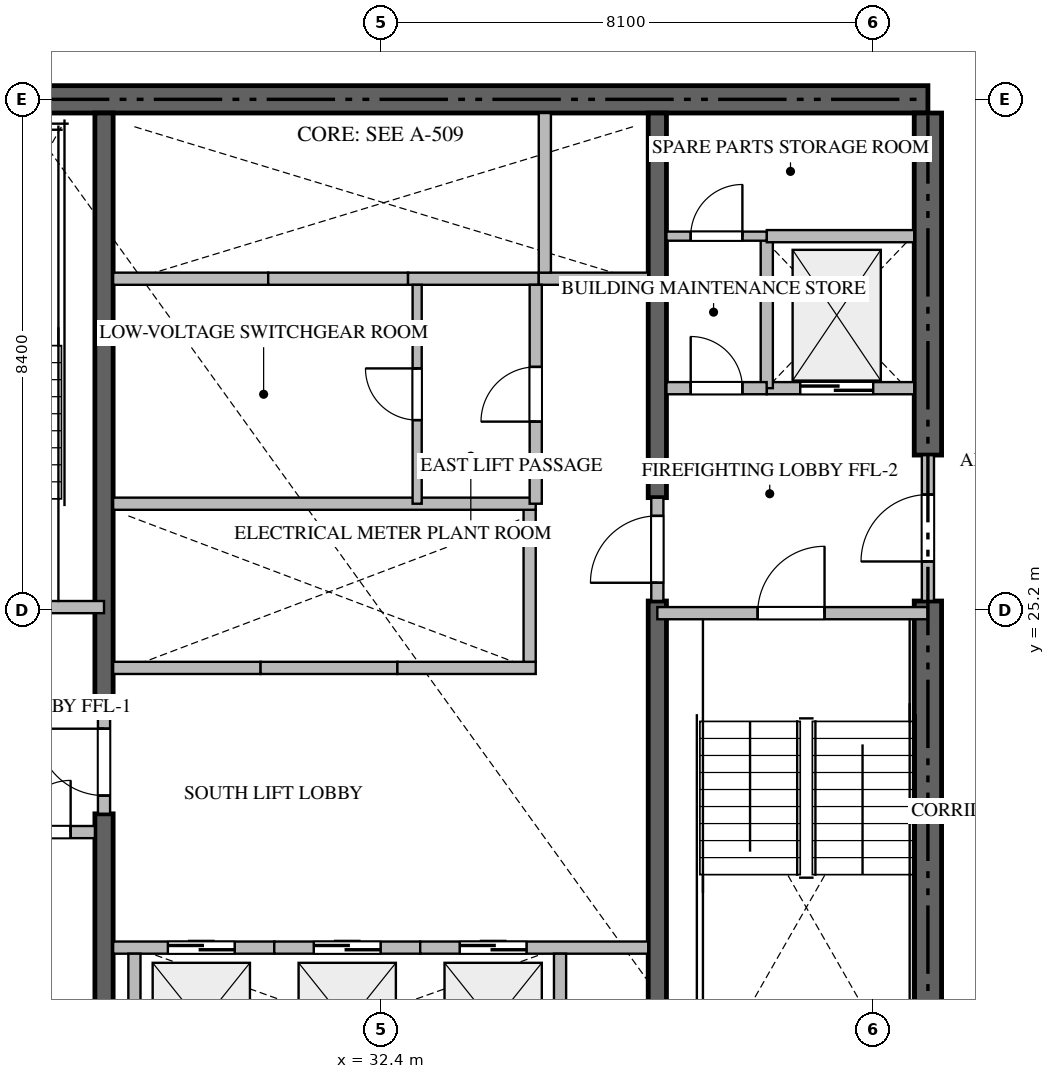
"""IFC4 building model, lengths in metres.
Left out: names, types, materials, properties, quantities, classifications, styles, units other than length and angle.
Written with IfcOpenShell. Run it as: python <this file> out.ifc"""

import sys

from ifc_helpers import new_model, si_unit, direction, frame, frame_2d, origin, place, context, subcontext, project, spatial, rectangle, extrude, source, transform, mapped, element, fill, save


model = new_model("IFC4")
c1 = context("Model", 3, precision=1e-05, world=origin(), true_north=direction((0.0, 1.0)))
c2 = subcontext(c1, "Body", "Model", "MODEL_VIEW")
j1 = project(units=[si_unit("LENGTHUNIT", "METRE"), si_unit("PLANEANGLEUNIT", "RADIAN")], contexts=[c1])
p1 = place(None, origin())
s1 = spatial("IfcSite", under=j1, at=p1, CompositionType="ELEMENT")
p2 = place(p1, origin())
s2 = spatial("IfcBuilding", under=s1, at=p2, CompositionType="ELEMENT")
p3 = place(p2, frame((0.0, 0.0, 26.7)))
s3 = spatial("IfcBuildingStorey", under=s2, at=p3, CompositionType="ELEMENT", Elevation=26.7)
p4 = place(p3, frame((41.4, 33.6, -0.44), z_axis=(0.0, 0.0, 1.0), x_axis=(-1.0, 0.0, 0.0)))
e1 = element("IfcWall", 1, at=p4, inside=s3, PredefinedType="SHEAR", context=c2, shape_type="SweptSolid", body=[
    extrude(rectangle(XDim=18.0, YDim=0.45, at=frame_2d((9.0, 0.0))), origin(), (0.0, 0.0, 1.0), 3.928),
])
p5 = place(p3, frame((41.4, 17.025, -0.44), z_axis=(0.0, 0.0, 1.0), x_axis=(0.0, 1.0, 0.0)))
e2 = element("IfcWall", 2, at=p5, inside=s3, PredefinedType="SHEAR", context=c2, shape_type="SweptSolid", body=[
    extrude(rectangle(XDim=8.325, YDim=0.45, at=frame_2d((4.163, 0.0))), origin(), (0.0, 0.0, 1.0), 3.928),
])
p6 = place(p3, frame((41.4, 27.75, -0.44), z_axis=(0.0, 0.0, 1.0), x_axis=(0.0, 1.0, 0.0)))
e3 = element("IfcWall", 3, at=p6, inside=s3, PredefinedType="SHEAR", context=c2, shape_type="SweptSolid", body=[
    extrude(rectangle(XDim=5.625, YDim=0.45, at=frame_2d((2.812, 0.0))), origin(), (0.0, 0.0, 1.0), 3.928),
])
p7 = place(p3, frame((27.85, 17.025, -0.44), z_axis=(0.0, 0.0, 1.0), x_axis=(0.0, 1.0, 0.0)))
e4 = element("IfcWall", 4, at=p7, inside=s3, PredefinedType="SHEAR", context=c2, shape_type="SweptSolid", body=[
    extrude(rectangle(XDim=4.825, YDim=0.3, at=frame_2d((2.413, 0.0))), origin(), (0.0, 0.0, 1.0), 3.928),
])
p8 = place(p3, frame((27.85, 23.55, -0.44), z_axis=(0.0, 0.0, 1.0), x_axis=(0.0, 1.0, 0.0)))
e5 = element("IfcWall", 5, at=p8, inside=s3, PredefinedType="SHEAR", context=c2, shape_type="SweptSolid", body=[
    extrude(rectangle(XDim=9.825, YDim=0.3, at=frame_2d((4.913, 0.0))), origin(), (0.0, 0.0, 1.0), 3.928),
])
p9 = place(p3, frame((36.95, 17.025, -0.44), z_axis=(0.0, 0.0, 1.0), x_axis=(0.0, 1.0, 0.0)))
e6 = element("IfcWall", 6, at=p9, inside=s3, PredefinedType="SHEAR", context=c2, shape_type="SweptSolid", body=[
    extrude(rectangle(XDim=8.325, YDim=0.3, at=frame_2d((4.163, 0.0))), origin(), (0.0, 0.0, 1.0), 3.928),
])
p10 = place(p3, frame((36.95, 27.05, -0.44), z_axis=(0.0, 0.0, 1.0), x_axis=(0.0, 1.0, 0.0)))
e7 = element("IfcWall", 7, at=p10, inside=s3, PredefinedType="SHEAR", context=c2, shape_type="SweptSolid", body=[
    extrude(rectangle(XDim=6.325, YDim=0.3, at=frame_2d((3.163, 0.0))), origin(), (0.0, 0.0, 1.0), 3.928),
])
p11 = place(p3, frame((23.4, 25.25, 0.0), z_axis=(0.0, 0.0, 1.0), x_axis=(1.0, 0.0, 0.0)))
e8 = element("IfcWall", 8, at=p11, inside=s3, PredefinedType="STANDARD", context=c2, shape_type="SweptSolid", body=[
    extrude(rectangle(XDim=4.45, YDim=0.2, at=frame_2d((2.225, 0.0))), origin(), (0.0, 0.0, 1.0), 3.49),
])
p12 = place(p11, frame((1.65, 0.0, 0.0)))
e9 = element("IfcOpeningElement", 9, at=p12, cuts=e8, PredefinedType="OPENING", context=c2, shape_type="SweptSolid", body=[
    extrude(rectangle(XDim=1.1, YDim=2.15, at=frame_2d((0.55, 1.075))), frame((0.0, 0.11, 0.0), z_axis=(0.0, -1.0, 0.0), x_axis=(1.0, 0.0, 0.0)), (0.0, 0.0, 1.0), 0.22),
])
p13 = place(p3, frame((36.95, 25.15, 0.0), z_axis=(0.0, 0.0, 1.0), x_axis=(1.0, 0.0, 0.0)))
e10 = element("IfcWall", 10, at=p13, inside=s3, PredefinedType="STANDARD", context=c2, shape_type="SweptSolid", body=[
    extrude(rectangle(XDim=4.45, YDim=0.2, at=frame_2d((2.225, 0.0))), origin(), (0.0, 0.0, 1.0), 3.49),
])
p14 = place(p13, frame((1.65, 0.0, 0.0)))
e11 = element("IfcOpeningElement", 11, at=p14, cuts=e10, PredefinedType="OPENING", context=c2, shape_type="SweptSolid", body=[
    extrude(rectangle(XDim=1.1, YDim=2.15, at=frame_2d((0.55, 1.075))), frame((0.0, 0.11, 0.0), z_axis=(0.0, -1.0, 0.0), x_axis=(1.0, 0.0, 0.0)), (0.0, 0.0, 1.0), 0.22),
])
p15 = place(p3, frame((38.75, 28.85, 0.0), z_axis=(0.0, 0.0, 1.0), x_axis=(1.0, 0.0, 0.0)))
e12 = element("IfcWall", 12, at=p15, inside=s3, PredefinedType="STANDARD", context=c2, shape_type="SweptSolid", body=[
    extrude(rectangle(XDim=2.425, YDim=0.2, at=frame_2d((1.212, 0.0))), origin(), (0.0, 0.0, 1.0), 3.49),
])
p16 = place(p15, frame((0.55, 0.0, 0.0)))
e13 = element("IfcOpeningElement", 13, at=p16, cuts=e12, PredefinedType="OPENING", context=c2, shape_type="SweptSolid", body=[
    extrude(rectangle(XDim=1.2, YDim=2.2, at=frame_2d((0.6, 1.1))), frame((0.0, 0.11, 0.0), z_axis=(0.0, -1.0, 0.0), x_axis=(1.0, 0.0, 0.0)), (0.0, 0.0, 1.0), 0.22),
])
p17 = place(p3, frame((28.0, 19.65, 0.0), z_axis=(0.0, 0.0, 1.0), x_axis=(1.0, 0.0, 0.0)))
e14 = element("IfcWall", 14, at=p17, inside=s3, PredefinedType="STANDARD", context=c2, shape_type="SweptSolid", body=[
    extrude(rectangle(XDim=2.65, YDim=0.2, at=frame_2d((1.325, 0.0))), origin(), (0.0, 0.0, 1.0), 3.49),
])
p18 = place(p17, frame((0.9, 0.0, 0.0)))
e15 = element("IfcOpeningElement", 15, at=p18, cuts=e14, PredefinedType="OPENING", context=c2, shape_type="SweptSolid", body=[
    extrude(rectangle(XDim=1.1, YDim=2.2, at=frame_2d((0.55, 1.1))), frame((0.0, 0.11, 0.0), z_axis=(0.0, -1.0, 0.0), x_axis=(1.0, 0.0, 0.0)), (0.0, 0.0, 1.0), 0.22),
])
p19 = place(p3, frame((28.35, 17.025, 0.0), z_axis=(0.0, 0.0, 1.0), x_axis=(0.0, 1.0, 0.0)))
e16 = element("IfcWall", 16, at=p19, inside=s3, PredefinedType="STANDARD", context=c2, shape_type="SweptSolid", body=[
    extrude(rectangle(XDim=2.525, YDim=0.2, at=frame_2d((1.263, 0.0))), origin(), (0.0, 0.0, 1.0), 3.49),
])
p20 = place(p3, frame((30.65, 19.65, 0.0), z_axis=(0.0, 0.0, 1.0), x_axis=(1.0, 0.0, 0.0)))
e17 = element("IfcWall", 17, at=p20, inside=s3, PredefinedType="STANDARD", context=c2, shape_type="SweptSolid", body=[
    extrude(rectangle(XDim=2.4, YDim=0.2, at=frame_2d((1.2, 0.0))), origin(), (0.0, 0.0, 1.0), 3.49),
])
p21 = place(p20, frame((0.65, 0.0, 0.0)))
e18 = element("IfcOpeningElement", 18, at=p21, cuts=e17, PredefinedType="OPENING", context=c2, shape_type="SweptSolid", body=[
    extrude(rectangle(XDim=1.1, YDim=2.2, at=frame_2d((0.55, 1.1))), frame((0.0, 0.11, 0.0), z_axis=(0.0, -1.0, 0.0), x_axis=(1.0, 0.0, 0.0)), (0.0, 0.0, 1.0), 0.22),
])
p22 = place(p3, frame((33.05, 19.65, 0.0), z_axis=(0.0, 0.0, 1.0), x_axis=(1.0, 0.0, 0.0)))
e19 = element("IfcWall", 19, at=p22, inside=s3, PredefinedType="STANDARD", context=c2, shape_type="SweptSolid", body=[
    extrude(rectangle(XDim=3.75, YDim=0.2, at=frame_2d((1.875, 0.0))), origin(), (0.0, 0.0, 1.0), 3.49),
])
p23 = place(p22, frame((0.65, 0.0, 0.0)))
e20 = element("IfcOpeningElement", 20, at=p23, cuts=e19, PredefinedType="OPENING", context=c2, shape_type="SweptSolid", body=[
    extrude(rectangle(XDim=1.1, YDim=2.2, at=frame_2d((0.55, 1.1))), frame((0.0, 0.11, 0.0), z_axis=(0.0, -1.0, 0.0), x_axis=(1.0, 0.0, 0.0)), (0.0, 0.0, 1.0), 0.22),
])
p24 = place(p3, frame((35.35, 17.025, 0.0), z_axis=(0.0, 0.0, 1.0), x_axis=(0.0, 1.0, 0.0)))
e21 = element("IfcWall", 21, at=p24, inside=s3, PredefinedType="STANDARD", context=c2, shape_type="SweptSolid", body=[
    extrude(rectangle(XDim=2.525, YDim=0.2, at=frame_2d((1.263, 0.0))), origin(), (0.0, 0.0, 1.0), 3.49),
])
p25 = place(p3, frame((28.0, 24.25, 0.0), z_axis=(0.0, 0.0, 1.0), x_axis=(1.0, 0.0, 0.0)))
e22 = element("IfcWall", 22, at=p25, inside=s3, PredefinedType="STANDARD", context=c2, shape_type="SweptSolid", body=[
    extrude(rectangle(XDim=2.425, YDim=0.2, at=frame_2d((1.212, 0.0))), origin(), (0.0, 0.0, 1.0), 3.49),
])
p26 = place(p3, frame((30.425, 24.25, 0.0), z_axis=(0.0, 0.0, 1.0), x_axis=(1.0, 0.0, 0.0)))
e23 = element("IfcWall", 23, at=p26, inside=s3, PredefinedType="STANDARD", context=c2, shape_type="SweptSolid", body=[
    extrude(rectangle(XDim=2.25, YDim=0.2, at=frame_2d((1.125, 0.0))), origin(), (0.0, 0.0, 1.0), 3.49),
])
p27 = place(p3, frame((32.675, 24.25, 0.0), z_axis=(0.0, 0.0, 1.0), x_axis=(1.0, 0.0, 0.0)))
e24 = element("IfcWall", 24, at=p27, inside=s3, PredefinedType="STANDARD", context=c2, shape_type="SweptSolid", body=[
    extrude(rectangle(XDim=2.275, YDim=0.2, at=frame_2d((1.137, 0.0))), origin(), (0.0, 0.0, 1.0), 3.49),
])
p28 = place(p3, frame((34.85, 24.35, 0.0), z_axis=(0.0, 0.0, 1.0), x_axis=(0.0, 1.0, 0.0)))
e25 = element("IfcWall", 25, at=p28, inside=s3, PredefinedType="STANDARD", context=c2, shape_type="SweptSolid", body=[
    extrude(rectangle(XDim=2.5, YDim=0.2, at=frame_2d((1.25, 0.0))), origin(), (0.0, 0.0, 1.0), 3.49),
])
p29 = place(p3, frame((28.0, 30.65, 0.0), z_axis=(0.0, 0.0, 1.0), x_axis=(1.0, 0.0, 0.0)))
e26 = element("IfcWall", 26, at=p29, inside=s3, PredefinedType="STANDARD", context=c2, shape_type="SweptSolid", body=[
    extrude(rectangle(XDim=2.55, YDim=0.2, at=frame_2d((1.275, 0.0))), origin(), (0.0, 0.0, 1.0), 3.49),
])
p30 = place(p3, frame((30.55, 30.65, 0.0), z_axis=(0.0, 0.0, 1.0), x_axis=(1.0, 0.0, 0.0)))
e27 = element("IfcWall", 27, at=p30, inside=s3, PredefinedType="STANDARD", context=c2, shape_type="SweptSolid", body=[
    extrude(rectangle(XDim=2.3, YDim=0.2, at=frame_2d((1.15, 0.0))), origin(), (0.0, 0.0, 1.0), 3.49),
])
p31 = place(p3, frame((32.85, 30.65, 0.0), z_axis=(0.0, 0.0, 1.0), x_axis=(1.0, 0.0, 0.0)))
e28 = element("IfcWall", 28, at=p31, inside=s3, PredefinedType="STANDARD", context=c2, shape_type="SweptSolid", body=[
    extrude(rectangle(XDim=2.15, YDim=0.2, at=frame_2d((1.075, 0.0))), origin(), (0.0, 0.0, 1.0), 3.49),
])
p32 = place(p3, frame((35.0, 30.65, 0.0), z_axis=(0.0, 0.0, 1.0), x_axis=(1.0, 0.0, 0.0)))
e29 = element("IfcWall", 29, at=p32, inside=s3, PredefinedType="STANDARD", context=c2, shape_type="SweptSolid", body=[
    extrude(rectangle(XDim=1.8, YDim=0.2, at=frame_2d((0.9, 0.0))), origin(), (0.0, 0.0, 1.0), 3.49),
])
p33 = place(p3, frame((35.1, 30.75, 0.0), z_axis=(0.0, 0.0, 1.0), x_axis=(0.0, 1.0, 0.0)))
e30 = element("IfcWall", 30, at=p33, inside=s3, PredefinedType="STANDARD", context=c2, shape_type="SweptSolid", body=[
    extrude(rectangle(XDim=2.625, YDim=0.2, at=frame_2d((1.312, 0.0))), origin(), (0.0, 0.0, 1.0), 3.49),
])
p34 = place(p3, frame((26.052, 21.55, 0.0), z_axis=(0.0, 0.0, 1.0), x_axis=(1.0, 0.0, 0.0)))
e31 = element("IfcWall", 31, at=p34, inside=s3, PredefinedType="STANDARD", context=c2, shape_type="SweptSolid", body=[
    extrude(rectangle(XDim=1.648, YDim=0.2, at=frame_2d((0.824, 0.0))), origin(), (0.0, 0.0, 1.0), 3.49),
])
p35 = place(p34, frame((0.399, 0.0, 0.0)))
e32 = element("IfcOpeningElement", 32, at=p35, cuts=e31, PredefinedType="OPENING", context=c2, shape_type="SweptSolid", body=[
    extrude(rectangle(XDim=0.85, YDim=2.1, at=frame_2d((0.425, 1.05))), frame((0.0, 0.11, 0.0), z_axis=(0.0, -1.0, 0.0), x_axis=(1.0, 0.0, 0.0)), (0.0, 0.0, 1.0), 0.22),
])
p36 = place(p3, frame((38.75, 28.85, 0.0), z_axis=(0.0, 0.0, 1.0), x_axis=(0.0, 1.0, 0.0)))
e33 = element("IfcWall", 33, at=p36, inside=s3, PredefinedType="STANDARD", context=c2, shape_type="SweptSolid", body=[
    extrude(rectangle(XDim=2.5, YDim=0.2, at=frame_2d((1.25, 0.0))), origin(), (0.0, 0.0, 1.0), 3.49),
])
p37 = place(p3, frame((38.75, 31.35, 0.0), z_axis=(0.0, 0.0, 1.0), x_axis=(1.0, 0.0, 0.0)))
e34 = element("IfcWall", 34, at=p37, inside=s3, PredefinedType="STANDARD", context=c2, shape_type="SweptSolid", body=[
    extrude(rectangle(XDim=2.425, YDim=0.2, at=frame_2d((1.212, 0.0))), origin(), (0.0, 0.0, 1.0), 3.49),
])
p38 = place(p3, frame((37.1, 28.85, 0.0), z_axis=(0.0, 0.0, 1.0), x_axis=(1.0, 0.0, 0.0)))
e35 = element("IfcWall", 35, at=p38, inside=s3, PredefinedType="STANDARD", context=c2, shape_type="SweptSolid", body=[
    extrude(rectangle(XDim=1.648, YDim=0.2, at=frame_2d((0.824, 0.0))), origin(), (0.0, 0.0, 1.0), 3.49),
])
p39 = place(p38, frame((0.399, 0.0, 0.0)))
e36 = element("IfcOpeningElement", 36, at=p39, cuts=e35, PredefinedType="OPENING", context=c2, shape_type="SweptSolid", body=[
    extrude(rectangle(XDim=0.85, YDim=2.1, at=frame_2d((0.425, 1.05))), frame((0.0, 0.11, 0.0), z_axis=(0.0, -1.0, 0.0), x_axis=(1.0, 0.0, 0.0)), (0.0, 0.0, 1.0), 0.22),
])
p40 = place(p3, frame((41.4, 25.352, 0.0), z_axis=(0.0, 0.0, 1.0), x_axis=(0.0, 1.0, 0.0)))
e37 = element("IfcWall", 37, at=p40, inside=s3, PredefinedType="STANDARD", context=c2, shape_type="SweptSolid", body=[
    extrude(rectangle(XDim=2.396, YDim=0.2, at=frame_2d((1.198, 0.0))), origin(), (0.0, 0.0, 1.0), 3.49),
])
p41 = place(p40, frame((0.648, 0.0, 0.0)))
e38 = element("IfcOpeningElement", 38, at=p41, cuts=e37, PredefinedType="OPENING", context=c2, shape_type="SweptSolid", body=[
    extrude(rectangle(XDim=1.1, YDim=2.15, at=frame_2d((0.55, 1.075))), frame((0.0, 0.11, 0.0), z_axis=(0.0, -1.0, 0.0), x_axis=(1.0, 0.0, 0.0)), (0.0, 0.0, 1.0), 0.22),
])
p42 = place(p3, frame((27.85, 21.852, 0.0), z_axis=(0.0, 0.0, 1.0), x_axis=(0.0, 1.0, 0.0)))
e39 = element("IfcWall", 39, at=p42, inside=s3, PredefinedType="STANDARD", context=c2, shape_type="SweptSolid", body=[
    extrude(rectangle(XDim=1.696, YDim=0.2, at=frame_2d((0.848, 0.0))), origin(), (0.0, 0.0, 1.0), 3.49),
])
p43 = place(p42, frame((0.298, 0.0, 0.0)))
e40 = element("IfcOpeningElement", 40, at=p43, cuts=e39, PredefinedType="OPENING", context=c2, shape_type="SweptSolid", body=[
    extrude(rectangle(XDim=1.1, YDim=2.15, at=frame_2d((0.55, 1.075))), frame((0.0, 0.11, 0.0), z_axis=(0.0, -1.0, 0.0), x_axis=(1.0, 0.0, 0.0)), (0.0, 0.0, 1.0), 0.22),
])
p44 = place(p3, frame((36.95, 25.352, 0.0), z_axis=(0.0, 0.0, 1.0), x_axis=(0.0, 1.0, 0.0)))
e41 = element("IfcWall", 41, at=p44, inside=s3, PredefinedType="STANDARD", context=c2, shape_type="SweptSolid", body=[
    extrude(rectangle(XDim=1.696, YDim=0.2, at=frame_2d((0.848, 0.0))), origin(), (0.0, 0.0, 1.0), 3.49),
])
p45 = place(p44, frame((0.298, 0.0, 0.0)))
e42 = element("IfcOpeningElement", 42, at=p45, cuts=e41, PredefinedType="OPENING", context=c2, shape_type="SweptSolid", body=[
    extrude(rectangle(XDim=1.1, YDim=2.15, at=frame_2d((0.55, 1.075))), frame((0.0, 0.11, 0.0), z_axis=(0.0, -1.0, 0.0), x_axis=(1.0, 0.0, 0.0)), (0.0, 0.0, 1.0), 0.22),
])
p46 = place(p3, frame((28.0, 26.95, 0.0), z_axis=(0.0, 0.0, 1.0), x_axis=(1.0, 0.0, 0.0)))
e43 = element("IfcWall", 43, at=p46, inside=s3, PredefinedType="STANDARD", context=c2, shape_type="SweptSolid", body=[
    extrude(rectangle(XDim=6.95, YDim=0.2, at=frame_2d((3.475, 0.0))), origin(), (0.0, 0.0, 1.0), 3.49),
])
p47 = place(p3, frame((37.1, 31.35, 0.0), z_axis=(0.0, 0.0, 1.0), x_axis=(1.0, 0.0, 0.0)))
e44 = element("IfcWall", 44, at=p47, inside=s3, PredefinedType="PARTITIONING", context=c2, shape_type="SweptSolid", body=[
    extrude(rectangle(XDim=1.648, YDim=0.15, at=frame_2d((0.824, 0.0))), origin(), (0.0, 0.0, 1.0), 3.49),
])
p48 = place(p47, frame((0.399, 0.0, 0.0)))
e45 = element("IfcOpeningElement", 45, at=p48, cuts=e44, PredefinedType="OPENING", context=c2, shape_type="SweptSolid", body=[
    extrude(rectangle(XDim=0.85, YDim=2.1, at=frame_2d((0.425, 1.05))), frame((0.0, 0.085, 0.0), z_axis=(0.0, -1.0, 0.0), x_axis=(1.0, 0.0, 0.0)), (0.0, 0.0, 1.0), 0.17),
])
p49 = place(p3, frame((34.95, 26.95, 0.0), z_axis=(0.0, 0.0, 1.0), x_axis=(0.0, 1.0, 0.0)))
e46 = element("IfcWall", 46, at=p49, inside=s3, PredefinedType="STANDARD", context=c2, shape_type="SweptSolid", body=[
    extrude(rectangle(XDim=3.6, YDim=0.2, at=frame_2d((1.8, 0.0))), origin(), (0.0, 0.0, 1.0), 3.49),
])
p50 = place(p49, frame((1.35, 0.0, 0.0)))
e47 = element("IfcOpeningElement", 47, at=p50, cuts=e46, PredefinedType="OPENING", context=c2, shape_type="SweptSolid", body=[
    extrude(rectangle(XDim=0.9, YDim=2.1, at=frame_2d((0.45, 1.05))), frame((0.0, 0.11, 0.0), z_axis=(0.0, -1.0, 0.0), x_axis=(1.0, 0.0, 0.0)), (0.0, 0.0, 1.0), 0.22),
])
p51 = place(p3, frame((33.0, 26.95, 0.0), z_axis=(0.0, 0.0, 1.0), x_axis=(0.0, 1.0, 0.0)))
e48 = element("IfcWall", 48, at=p51, inside=s3, PredefinedType="PARTITIONING", context=c2, shape_type="SweptSolid", body=[
    extrude(rectangle(XDim=3.6, YDim=0.15, at=frame_2d((1.8, 0.0))), origin(), (0.0, 0.0, 1.0), 3.49),
])
p52 = place(p51, frame((1.375, 0.0, 0.0)))
e49 = element("IfcOpeningElement", 49, at=p52, cuts=e48, PredefinedType="OPENING", context=c2, shape_type="SweptSolid", body=[
    extrude(rectangle(XDim=0.85, YDim=2.1, at=frame_2d((0.425, 1.05))), frame((0.0, 0.085, 0.0), z_axis=(0.0, -1.0, 0.0), x_axis=(1.0, 0.0, 0.0)), (0.0, 0.0, 1.0), 0.17),
])
m1 = source(origin(), c2, "Body", "SweptSolid", [
    extrude(rectangle(XDim=1.1, YDim=2.15, at=frame_2d((0.55, 1.075))), frame((0.0, 0.025, 0.0), z_axis=(0.0, -1.0, 0.0), x_axis=(1.0, 0.0, 0.0)), (0.0, 0.0, 1.0), 0.05),
])
p53 = place(p14, origin())
e50 = element("IfcDoor", 50, at=p53, inside=s3, OperationType="SINGLE_SWING_RIGHT", PredefinedType="DOOR", context=c2, shape_type="MappedRepresentation", body=[
    mapped(m1, transform((0.0, 0.0, 0.0), scale=1.0)),
])
fill(e11, e50)
m2 = source(origin(), c2, "Body", "SweptSolid", [
    extrude(rectangle(XDim=1.2, YDim=2.2, at=frame_2d((0.6, 1.1))), frame((0.0, 0.025, 0.0), z_axis=(0.0, -1.0, 0.0), x_axis=(1.0, 0.0, 0.0)), (0.0, 0.0, 1.0), 0.05),
])
p54 = place(p16, origin())
e51 = element("IfcDoor", 51, at=p54, inside=s3, OperationType="DOUBLE_DOOR_SLIDING", PredefinedType="DOOR", context=c2, shape_type="MappedRepresentation", body=[
    mapped(m2, transform((0.0, 0.0, 0.0), scale=1.0)),
])
fill(e13, e51)
m3 = source(origin(), c2, "Body", "SweptSolid", [
    extrude(rectangle(XDim=1.1, YDim=2.2, at=frame_2d((0.55, 1.1))), frame((0.0, 0.025, 0.0), z_axis=(0.0, -1.0, 0.0), x_axis=(1.0, 0.0, 0.0)), (0.0, 0.0, 1.0), 0.05),
])
p55 = place(p18, origin())
e52 = element("IfcDoor", 52, at=p55, inside=s3, OperationType="DOUBLE_DOOR_SLIDING", PredefinedType="DOOR", context=c2, shape_type="MappedRepresentation", body=[
    mapped(m3, transform((0.0, 0.0, 0.0), scale=1.0)),
])
fill(e15, e52)
p56 = place(p21, origin())
e53 = element("IfcDoor", 53, at=p56, inside=s3, OperationType="DOUBLE_DOOR_SLIDING", PredefinedType="DOOR", context=c2, shape_type="MappedRepresentation", body=[
    mapped(m3, transform((0.0, 0.0, 0.0), scale=1.0)),
])
fill(e18, e53)
p57 = place(p23, origin())
e54 = element("IfcDoor", 54, at=p57, inside=s3, OperationType="DOUBLE_DOOR_SLIDING", PredefinedType="DOOR", context=c2, shape_type="MappedRepresentation", body=[
    mapped(m3, transform((0.0, 0.0, 0.0), scale=1.0)),
])
fill(e20, e54)
m4 = source(origin(), c2, "Body", "SweptSolid", [
    extrude(rectangle(XDim=0.85, YDim=2.1, at=frame_2d((0.425, 1.05))), frame((0.0, 0.025, 0.0), z_axis=(0.0, -1.0, 0.0), x_axis=(1.0, 0.0, 0.0)), (0.0, 0.0, 1.0), 0.05),
])
p58 = place(p35, origin())
e55 = element("IfcDoor", 55, at=p58, inside=s3, OperationType="SINGLE_SWING_RIGHT", PredefinedType="DOOR", context=c2, shape_type="MappedRepresentation", body=[
    mapped(m4, transform((0.0, 0.0, 0.0), scale=1.0)),
])
fill(e32, e55)
p59 = place(p39, origin())
e56 = element("IfcDoor", 56, at=p59, inside=s3, OperationType="SINGLE_SWING_LEFT", PredefinedType="DOOR", context=c2, shape_type="MappedRepresentation", body=[
    mapped(m4, transform((0.0, 0.0, 0.0), scale=1.0)),
])
fill(e36, e56)
p60 = place(p41, origin())
e57 = element("IfcDoor", 57, at=p60, inside=s3, OperationType="SINGLE_SWING_LEFT", PredefinedType="DOOR", context=c2, shape_type="MappedRepresentation", body=[
    mapped(m1, transform((0.0, 0.0, 0.0), scale=1.0)),
])
fill(e38, e57)
p61 = place(p43, origin())
e58 = element("IfcDoor", 58, at=p61, inside=s3, OperationType="SINGLE_SWING_RIGHT", PredefinedType="DOOR", context=c2, shape_type="MappedRepresentation", body=[
    mapped(m1, transform((0.0, 0.0, 0.0), scale=1.0)),
])
fill(e40, e58)
p62 = place(p45, origin())
e59 = element("IfcDoor", 59, at=p62, inside=s3, OperationType="SINGLE_SWING_LEFT", PredefinedType="DOOR", context=c2, shape_type="MappedRepresentation", body=[
    mapped(m1, transform((0.0, 0.0, 0.0), scale=1.0)),
])
fill(e42, e59)
p63 = place(p48, origin())
e60 = element("IfcDoor", 60, at=p63, inside=s3, OperationType="SINGLE_SWING_RIGHT", PredefinedType="DOOR", context=c2, shape_type="MappedRepresentation", body=[
    mapped(m4, transform((0.0, 0.0, 0.0), scale=1.0)),
])
fill(e45, e60)
m5 = source(origin(), c2, "Body", "SweptSolid", [
    extrude(rectangle(XDim=0.9, YDim=2.1, at=frame_2d((0.45, 1.05))), frame((0.0, 0.025, 0.0), z_axis=(0.0, -1.0, 0.0), x_axis=(1.0, 0.0, 0.0)), (0.0, 0.0, 1.0), 0.05),
])
p64 = place(p50, origin())
e61 = element("IfcDoor", 61, at=p64, inside=s3, OperationType="SINGLE_SWING_LEFT", PredefinedType="DOOR", context=c2, shape_type="MappedRepresentation", body=[
    mapped(m5, transform((0.0, 0.0, 0.0), scale=1.0)),
])
fill(e47, e61)
p65 = place(p52, origin())
e62 = element("IfcDoor", 62, at=p65, inside=s3, OperationType="SINGLE_SWING_RIGHT", PredefinedType="DOOR", context=c2, shape_type="MappedRepresentation", body=[
    mapped(m4, transform((0.0, 0.0, 0.0), scale=1.0)),
])
fill(e49, e62)
save(model, sys.argv[1])
